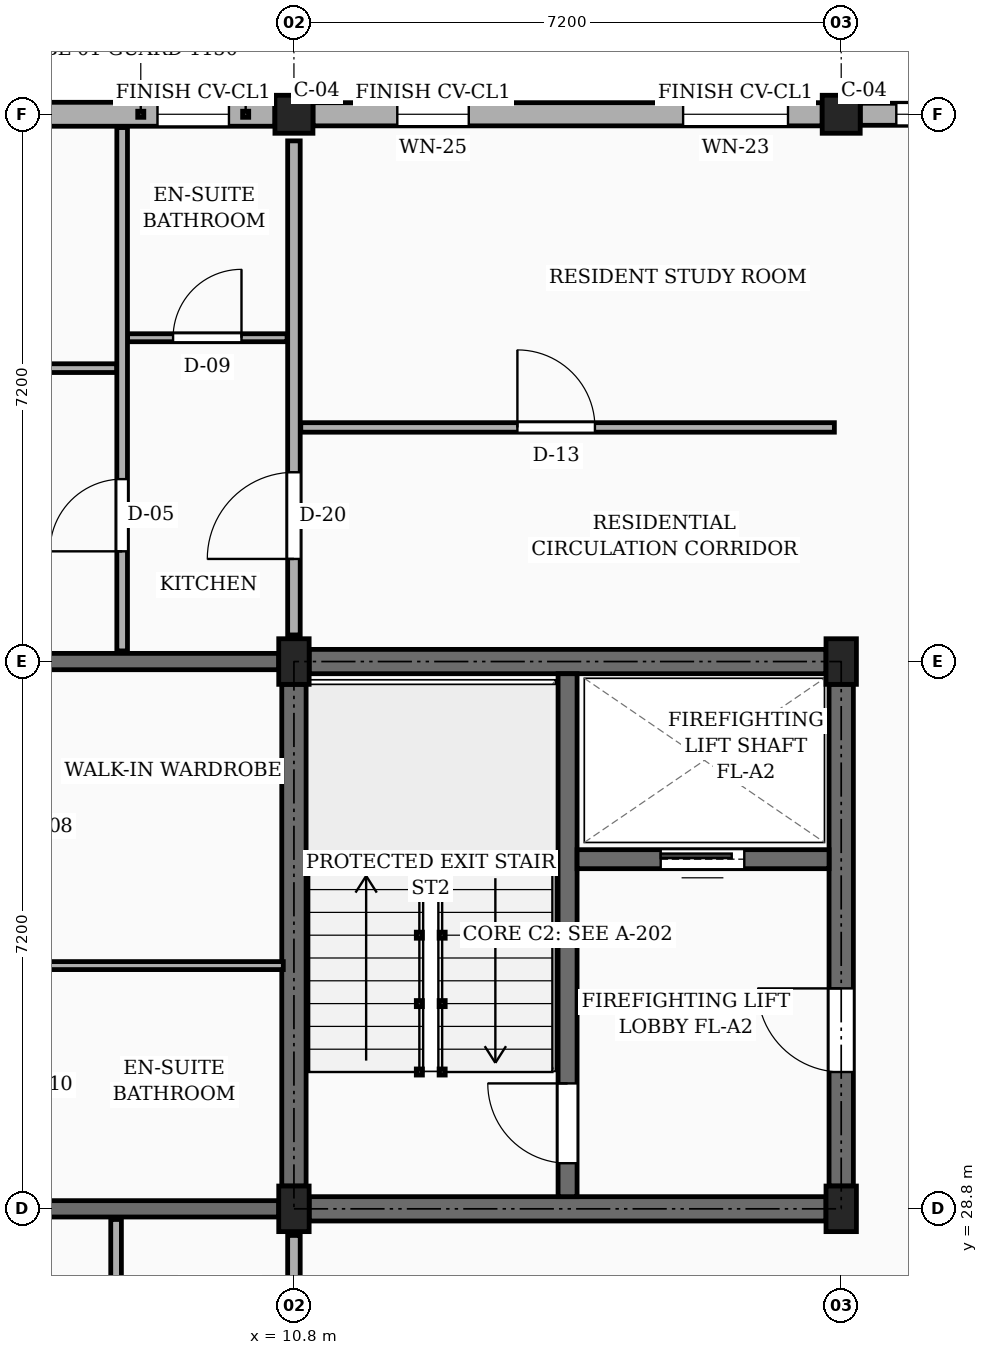
"""IFC4 building model, lengths in metres.
Left out: names, types, materials, properties, quantities, classifications, styles, units other than length and angle.
Written with IfcOpenShell. Run it as: python <this file> out.ifc"""

import sys

from ifc_helpers import new_model, si_unit, direction, frame, frame_2d, origin, origin_2d, place, context, subcontext, project, spatial, rectangle, extrude, element, fill, save


model = new_model("IFC4")
c1 = context("Model", 3, precision=1e-05, world=origin(), true_north=direction((0.0, 1.0)))
c2 = subcontext(c1, "Body", "Model", "MODEL_VIEW")
j1 = project(units=[si_unit("LENGTHUNIT", "METRE"), si_unit("PLANEANGLEUNIT", "RADIAN")], contexts=[c1])
p1 = place(None, origin())
s1 = spatial("IfcSite", under=j1, at=p1, CompositionType="ELEMENT")
p2 = place(p1, origin())
s2 = spatial("IfcBuilding", under=s1, at=p2, CompositionType="ELEMENT")
p3 = place(p2, frame((0.0, 0.0, 26.55)))
s3 = spatial("IfcBuildingStorey", under=s2, at=p3, CompositionType="ELEMENT", Elevation=26.55)
for number, where, z_axis, x_axis in (
    (1, (10.8, 28.8, 0.0), (0.0, 0.0, 1.0), (1.0, 0.0, 0.0)),
    (2, (10.8, 36.0, 0.0), (0.0, 0.0, 1.0), (1.0, 0.0, 0.0)),
):
    element("IfcColumn", number, at=place(p3, frame(where, z_axis=z_axis, x_axis=x_axis)), inside=s3, PredefinedType="COLUMN", context=c2, shape_type="SweptSolid", body=[
        extrude(rectangle(XDim=0.4, YDim=0.6, at=origin_2d()), origin(), (0.0, 0.0, 1.0), 3.15),
    ])
p4 = place(p3, frame((10.8, 43.2, 0.0), z_axis=(0.0, 0.0, 1.0), x_axis=(1.0, 0.0, 0.0)))
e3 = element("IfcColumn", 3, at=p4, inside=s3, PredefinedType="COLUMN", context=c2, shape_type="SweptSolid", body=[
    extrude(rectangle(XDim=0.5, YDim=0.5, at=origin_2d()), origin(), (0.0, 0.0, 1.0), 3.15),
])
for number, where, z_axis, x_axis in (
    (4, (18.0, 28.8, 0.0), (0.0, 0.0, 1.0), (1.0, 0.0, 0.0)),
    (5, (18.0, 36.0, 0.0), (0.0, 0.0, 1.0), (1.0, 0.0, 0.0)),
):
    element("IfcColumn", number, at=place(p3, frame(where, z_axis=z_axis, x_axis=x_axis)), inside=s3, PredefinedType="COLUMN", context=c2, shape_type="SweptSolid", body=[
        extrude(rectangle(XDim=0.4, YDim=0.6, at=origin_2d()), origin(), (0.0, 0.0, 1.0), 3.15),
    ])
p5 = place(p3, frame((18.0, 43.2, 0.0), z_axis=(0.0, 0.0, 1.0), x_axis=(1.0, 0.0, 0.0)))
e6 = element("IfcColumn", 6, at=p5, inside=s3, PredefinedType="COLUMN", context=c2, shape_type="SweptSolid", body=[
    extrude(rectangle(XDim=0.5, YDim=0.5, at=origin_2d()), origin(), (0.0, 0.0, 1.0), 3.15),
])
p6 = place(p3, frame((3.85, 28.8, 0.0), z_axis=(0.0, 0.0, 1.0), x_axis=(1.0, 0.0, 0.0)))
e7 = element("IfcWall", 7, at=p6, inside=s3, PredefinedType="SOLIDWALL", context=c2, shape_type="SweptSolid", body=[
    extrude(rectangle(XDim=6.75, YDim=0.215, at=frame_2d((3.375, 0.0))), origin(), (0.0, 0.0, 1.0), 2.17),
])
p7 = place(p6, frame((1.35, 0.0, 0.0)))
e8 = element("IfcOpeningElement", 8, at=p7, cuts=e7, PredefinedType="OPENING", context=c2, shape_type="SweptSolid", body=[
    extrude(rectangle(XDim=0.98, YDim=2.12, at=frame_2d((0.49, 1.06))), frame((0.0, 0.118, 0.0), z_axis=(0.0, -1.0, 0.0), x_axis=(1.0, 0.0, 0.0)), (0.0, 0.0, 1.0), 0.235),
])
p8 = place(p3, frame((3.85, 36.0, 0.0), z_axis=(0.0, 0.0, 1.0), x_axis=(1.0, 0.0, 0.0)))
e9 = element("IfcWall", 9, at=p8, inside=s3, PredefinedType="SOLIDWALL", context=c2, shape_type="SweptSolid", body=[
    extrude(rectangle(XDim=6.75, YDim=0.215, at=frame_2d((3.375, 0.0))), origin(), (0.0, 0.0, 1.0), 2.17),
])
p9 = place(p3, frame((24.95, 43.2, 0.0), z_axis=(0.0, 0.0, 1.0), x_axis=(-1.0, 0.0, 0.0)))
e10 = element("IfcWall", 10, at=p9, inside=s3, PredefinedType="SOLIDWALL", context=c2, shape_type="SweptSolid", body=[
    extrude(rectangle(XDim=6.7, YDim=0.29, at=frame_2d((3.35, 0.0))), origin(), (0.0, 0.0, 1.0), 2.44),
])
p10 = place(p9, frame((0.45, 0.0, 0.78)))
e11 = element("IfcOpeningElement", 11, at=p10, cuts=e10, PredefinedType="OPENING", context=c2, shape_type="SweptSolid", body=[
    extrude(rectangle(XDim=1.14, YDim=1.36, at=frame_2d((0.57, 0.68))), frame((0.0, 0.155, 0.0), z_axis=(0.0, -1.0, 0.0), x_axis=(1.0, 0.0, 0.0)), (0.0, 0.0, 1.0), 0.31),
])
p11 = place(p9, frame((2.725, 0.0, 0.78)))
e12 = element("IfcOpeningElement", 12, at=p11, cuts=e10, PredefinedType="OPENING", context=c2, shape_type="SweptSolid", body=[
    extrude(rectangle(XDim=1.3, YDim=1.36, at=frame_2d((0.65, 0.68))), frame((0.0, 0.155, 0.0), z_axis=(0.0, -1.0, 0.0), x_axis=(1.0, 0.0, 0.0)), (0.0, 0.0, 1.0), 0.31),
])
p12 = place(p9, frame((5.185, 0.0, 0.78)))
e13 = element("IfcOpeningElement", 13, at=p12, cuts=e10, PredefinedType="OPENING", context=c2, shape_type="SweptSolid", body=[
    extrude(rectangle(XDim=1.04, YDim=1.26, at=frame_2d((0.52, 0.63))), frame((0.0, 0.155, 0.0), z_axis=(0.0, -1.0, 0.0), x_axis=(1.0, 0.0, 0.0)), (0.0, 0.0, 1.0), 0.31),
])
p13 = place(p3, frame((17.75, 43.2, 0.0), z_axis=(0.0, 0.0, 1.0), x_axis=(-1.0, 0.0, 0.0)))
e14 = element("IfcWall", 14, at=p13, inside=s3, PredefinedType="SOLIDWALL", context=c2, shape_type="SweptSolid", body=[
    extrude(rectangle(XDim=6.7, YDim=0.305, at=frame_2d((3.35, 0.0))), origin(), (0.0, 0.0, 1.0), 2.44),
])
p14 = place(p13, frame((0.45, 0.0, 0.78)))
e15 = element("IfcOpeningElement", 15, at=p14, cuts=e14, PredefinedType="OPENING", context=c2, shape_type="SweptSolid", body=[
    extrude(rectangle(XDim=1.38, YDim=1.36, at=frame_2d((0.69, 0.68))), frame((0.0, 0.163, 0.0), z_axis=(0.0, -1.0, 0.0), x_axis=(1.0, 0.0, 0.0)), (0.0, 0.0, 1.0), 0.325),
])
p15 = place(p13, frame((4.65, 0.0, 0.78)))
e16 = element("IfcOpeningElement", 16, at=p15, cuts=e14, PredefinedType="OPENING", context=c2, shape_type="SweptSolid", body=[
    extrude(rectangle(XDim=0.94, YDim=1.44, at=frame_2d((0.47, 0.72))), frame((0.0, 0.163, 0.0), z_axis=(0.0, -1.0, 0.0), x_axis=(1.0, 0.0, 0.0)), (0.0, 0.0, 1.0), 0.325),
])
p16 = place(p3, frame((10.55, 43.2, 0.0), z_axis=(0.0, 0.0, 1.0), x_axis=(-1.0, 0.0, 0.0)))
e17 = element("IfcWall", 17, at=p16, inside=s3, PredefinedType="SOLIDWALL", context=c2, shape_type="SweptSolid", body=[
    extrude(rectangle(XDim=6.7, YDim=0.315, at=frame_2d((3.35, 0.0))), origin(), (0.0, 0.0, 1.0), 2.44),
])
p17 = place(p16, frame((0.605, 0.0, 0.78)))
e18 = element("IfcOpeningElement", 18, at=p17, cuts=e17, PredefinedType="OPENING", context=c2, shape_type="SweptSolid", body=[
    extrude(rectangle(XDim=0.94, YDim=1.44, at=frame_2d((0.47, 0.72))), frame((0.0, 0.167, 0.0), z_axis=(0.0, -1.0, 0.0), x_axis=(1.0, 0.0, 0.0)), (0.0, 0.0, 1.0), 0.335),
])
p18 = place(p16, frame((3.71, 0.0, 0.78)))
e19 = element("IfcOpeningElement", 19, at=p18, cuts=e17, PredefinedType="OPENING", context=c2, shape_type="SweptSolid", body=[
    extrude(rectangle(XDim=1.15, YDim=1.44, at=frame_2d((0.575, 0.72))), frame((0.0, 0.167, 0.0), z_axis=(0.0, -1.0, 0.0), x_axis=(1.0, 0.0, 0.0)), (0.0, 0.0, 1.0), 0.335),
])
p19 = place(p3, frame((10.8, 29.1, 0.0), z_axis=(0.0, 0.0, 1.0), x_axis=(0.0, 1.0, 0.0)))
e20 = element("IfcWall", 20, at=p19, inside=s3, PredefinedType="SHEAR", context=c2, shape_type="SweptSolid", body=[
    extrude(rectangle(XDim=6.6, YDim=0.32, at=frame_2d((3.3, 0.0))), origin(), (0.0, 0.0, 1.0), 2.87),
])
p20 = place(p3, frame((11.0, 36.0, 0.0), z_axis=(0.0, 0.0, 1.0), x_axis=(1.0, 0.0, 0.0)))
e21 = element("IfcWall", 21, at=p20, inside=s3, PredefinedType="SHEAR", context=c2, shape_type="SweptSolid", body=[
    extrude(rectangle(XDim=6.8, YDim=0.32, at=frame_2d((3.4, 0.0))), origin(), (0.0, 0.0, 1.0), 2.87),
])
p21 = place(p3, frame((18.0, 29.1, 0.0), z_axis=(0.0, 0.0, 1.0), x_axis=(0.0, 1.0, 0.0)))
e22 = element("IfcWall", 22, at=p21, inside=s3, PredefinedType="SHEAR", context=c2, shape_type="SweptSolid", body=[
    extrude(rectangle(XDim=6.6, YDim=0.32, at=frame_2d((3.3, 0.0))), origin(), (0.0, 0.0, 1.0), 2.87),
])
p22 = place(p21, frame((1.5, 0.0, 0.0)))
e23 = element("IfcOpeningElement", 23, at=p22, cuts=e22, PredefinedType="OPENING", context=c2, shape_type="SweptSolid", body=[
    extrude(rectangle(XDim=1.1, YDim=2.15, at=frame_2d((0.55, 1.075))), frame((0.0, 0.17, 0.0), z_axis=(0.0, -1.0, 0.0), x_axis=(1.0, 0.0, 0.0)), (0.0, 0.0, 1.0), 0.34),
])
p23 = place(p3, frame((11.0, 28.8, 0.0), z_axis=(0.0, 0.0, 1.0), x_axis=(1.0, 0.0, 0.0)))
e24 = element("IfcWall", 24, at=p23, inside=s3, PredefinedType="SHEAR", context=c2, shape_type="SweptSolid", body=[
    extrude(rectangle(XDim=6.8, YDim=0.32, at=frame_2d((3.4, 0.0))), origin(), (0.0, 0.0, 1.0), 2.87),
])
p24 = place(p3, frame((14.4, 28.96, 0.0), z_axis=(0.0, 0.0, 1.0), x_axis=(0.0, 1.0, 0.0)))
e25 = element("IfcWall", 25, at=p24, inside=s3, PredefinedType="SHEAR", context=c2, shape_type="SweptSolid", body=[
    extrude(rectangle(XDim=6.88, YDim=0.25, at=frame_2d((3.44, 0.0))), origin(), (0.0, 0.0, 1.0), 2.87),
])
p25 = place(p24, frame((0.44, 0.0, 0.0)))
e26 = element("IfcOpeningElement", 26, at=p25, cuts=e25, PredefinedType="OPENING", context=c2, shape_type="SweptSolid", body=[
    extrude(rectangle(XDim=1.05, YDim=2.15, at=frame_2d((0.525, 1.075))), frame((0.0, 0.135, 0.0), z_axis=(0.0, -1.0, 0.0), x_axis=(1.0, 0.0, 0.0)), (0.0, 0.0, 1.0), 0.27),
])
p26 = place(p3, frame((14.525, 33.4, 0.0), z_axis=(0.0, 0.0, 1.0), x_axis=(1.0, 0.0, 0.0)))
e27 = element("IfcWall", 27, at=p26, inside=s3, PredefinedType="SHEAR", context=c2, shape_type="SweptSolid", body=[
    extrude(rectangle(XDim=3.315, YDim=0.25, at=frame_2d((1.658, 0.0))), origin(), (0.0, 0.0, 1.0), 2.87),
])
p27 = place(p26, frame((1.1, 0.0, 0.0)))
e28 = element("IfcOpeningElement", 28, at=p27, cuts=e27, PredefinedType="OPENING", context=c2, shape_type="SweptSolid", body=[
    extrude(rectangle(XDim=1.1, YDim=2.2, at=frame_2d((0.55, 1.1))), frame((0.0, 0.135, 0.0), z_axis=(0.0, -1.0, 0.0), x_axis=(1.0, 0.0, 0.0)), (0.0, 0.0, 1.0), 0.27),
])
p28 = place(p3, frame((10.8, 21.95, 0.0), z_axis=(0.0, 0.0, 1.0), x_axis=(0.0, 1.0, 0.0)))
e29 = element("IfcWall", 29, at=p28, inside=s3, PredefinedType="PARTITIONING", context=c2, shape_type="SweptSolid", body=[
    extrude(rectangle(XDim=6.5, YDim=0.165, at=frame_2d((3.25, 0.0))), origin(), (0.0, 0.0, 1.0), 2.305),
])
p29 = place(p28, frame((1.0, 0.0, 0.0)))
e30 = element("IfcOpeningElement", 30, at=p29, cuts=e29, PredefinedType="OPENING", context=c2, shape_type="SweptSolid", body=[
    extrude(rectangle(XDim=0.94, YDim=2.12, at=frame_2d((0.47, 1.06))), frame((0.0, 0.093, 0.0), z_axis=(0.0, -1.0, 0.0), x_axis=(1.0, 0.0, 0.0)), (0.0, 0.0, 1.0), 0.185),
])
p30 = place(p3, frame((10.8, 36.35, 0.0), z_axis=(0.0, 0.0, 1.0), x_axis=(0.0, 1.0, 0.0)))
e31 = element("IfcWall", 31, at=p30, inside=s3, PredefinedType="PARTITIONING", context=c2, shape_type="SweptSolid", body=[
    extrude(rectangle(XDim=6.5, YDim=0.165, at=frame_2d((3.25, 0.0))), origin(), (0.0, 0.0, 1.0), 2.305),
])
p31 = place(p30, frame((1.0, 0.0, 0.0)))
e32 = element("IfcOpeningElement", 32, at=p31, cuts=e31, PredefinedType="OPENING", context=c2, shape_type="SweptSolid", body=[
    extrude(rectangle(XDim=1.14, YDim=2.18, at=frame_2d((0.57, 1.09))), frame((0.0, 0.093, 0.0), z_axis=(0.0, -1.0, 0.0), x_axis=(1.0, 0.0, 0.0)), (0.0, 0.0, 1.0), 0.185),
])
p32 = place(p3, frame((8.46, 21.74, 0.0), z_axis=(0.0, 0.0, 1.0), x_axis=(0.0, 1.0, 0.0)))
e33 = element("IfcWall", 33, at=p32, inside=s3, PredefinedType="PARTITIONING", context=c2, shape_type="SweptSolid", body=[
    extrude(rectangle(XDim=6.92, YDim=0.14, at=frame_2d((3.46, 0.0))), origin(), (0.0, 0.0, 1.0), 2.305),
])
p33 = place(p32, frame((1.31, 0.0, 0.0)))
e34 = element("IfcOpeningElement", 34, at=p33, cuts=e33, PredefinedType="OPENING", context=c2, shape_type="SweptSolid", body=[
    extrude(rectangle(XDim=0.92, YDim=2.1, at=frame_2d((0.46, 1.05))), frame((0.0, 0.08, 0.0), z_axis=(0.0, -1.0, 0.0), x_axis=(1.0, 0.0, 0.0)), (0.0, 0.0, 1.0), 0.16),
])
p34 = place(p3, frame((7.27, 32.0, 0.0), z_axis=(0.0, 0.0, 1.0), x_axis=(1.0, 0.0, 0.0)))
e35 = element("IfcWall", 35, at=p34, inside=s3, PredefinedType="PARTITIONING", context=c2, shape_type="SweptSolid", body=[
    extrude(rectangle(XDim=3.39, YDim=0.105, at=frame_2d((1.695, 0.0))), origin(), (0.0, 0.0, 1.0), 2.305),
])
p35 = place(p3, frame((10.89, 39.08, 0.0), z_axis=(0.0, 0.0, 1.0), x_axis=(1.0, 0.0, 0.0)))
e36 = element("IfcWall", 36, at=p35, inside=s3, PredefinedType="PARTITIONING", context=c2, shape_type="SweptSolid", body=[
    extrude(rectangle(XDim=7.02, YDim=0.125, at=frame_2d((3.51, 0.0))), origin(), (0.0, 0.0, 1.0), 2.305),
])
p36 = place(p35, frame((2.85, 0.0, 0.0)))
e37 = element("IfcOpeningElement", 37, at=p36, cuts=e36, PredefinedType="OPENING", context=c2, shape_type="SweptSolid", body=[
    extrude(rectangle(XDim=1.02, YDim=2.15, at=frame_2d((0.51, 1.075))), frame((0.0, 0.073, 0.0), z_axis=(0.0, -1.0, 0.0), x_axis=(1.0, 0.0, 0.0)), (0.0, 0.0, 1.0), 0.145),
])
p37 = place(p3, frame((3.775, 39.86, 0.0), z_axis=(0.0, 0.0, 1.0), x_axis=(1.0, 0.0, 0.0)))
e38 = element("IfcWall", 38, at=p37, inside=s3, PredefinedType="PARTITIONING", context=c2, shape_type="SweptSolid", body=[
    extrude(rectangle(XDim=4.695, YDim=0.115, at=frame_2d((2.348, 0.0))), origin(), (0.0, 0.0, 1.0), 2.305),
])
p38 = place(p37, frame((1.897, 0.0, 0.0)))
e39 = element("IfcOpeningElement", 39, at=p38, cuts=e38, PredefinedType="OPENING", context=c2, shape_type="SweptSolid", body=[
    extrude(rectangle(XDim=0.9, YDim=2.1, at=frame_2d((0.45, 1.05))), frame((0.0, 0.067, 0.0), z_axis=(0.0, -1.0, 0.0), x_axis=(1.0, 0.0, 0.0)), (0.0, 0.0, 1.0), 0.135),
])
p39 = place(p3, frame((8.61, 40.26, 0.0), z_axis=(0.0, 0.0, 1.0), x_axis=(1.0, 0.0, 0.0)))
e40 = element("IfcWall", 40, at=p39, inside=s3, PredefinedType="PARTITIONING", context=c2, shape_type="SweptSolid", body=[
    extrude(rectangle(XDim=2.1, YDim=0.105, at=frame_2d((1.05, 0.0))), origin(), (0.0, 0.0, 1.0), 2.305),
])
p40 = place(p39, frame((0.6, 0.0, 0.0)))
e41 = element("IfcOpeningElement", 41, at=p40, cuts=e40, PredefinedType="OPENING", context=c2, shape_type="SweptSolid", body=[
    extrude(rectangle(XDim=0.9, YDim=2.05, at=frame_2d((0.45, 1.025))), frame((0.0, 0.062, 0.0), z_axis=(0.0, -1.0, 0.0), x_axis=(1.0, 0.0, 0.0)), (0.0, 0.0, 1.0), 0.125),
])
p41 = place(p3, frame((8.54, 36.14, 0.0), z_axis=(0.0, 0.0, 1.0), x_axis=(0.0, 1.0, 0.0)))
e42 = element("IfcWall", 42, at=p41, inside=s3, PredefinedType="PARTITIONING", context=c2, shape_type="SweptSolid", body=[
    extrude(rectangle(XDim=6.885, YDim=0.14, at=frame_2d((3.442, 0.0))), origin(), (0.0, 0.0, 1.0), 2.305),
])
p42 = place(p41, frame((1.31, 0.0, 0.0)))
e43 = element("IfcOpeningElement", 43, at=p42, cuts=e42, PredefinedType="OPENING", context=c2, shape_type="SweptSolid", body=[
    extrude(rectangle(XDim=0.95, YDim=2.1, at=frame_2d((0.475, 1.05))), frame((0.0, 0.08, 0.0), z_axis=(0.0, -1.0, 0.0), x_axis=(1.0, 0.0, 0.0)), (0.0, 0.0, 1.0), 0.16),
])
p43 = place(p12, origin())
e44 = element("IfcWindow", 44, at=p43, inside=s3, PartitioningType="SINGLE_PANEL", PredefinedType="WINDOW", context=c2, shape_type="SweptSolid", body=[
    extrude(rectangle(XDim=1.04, YDim=1.26, at=frame_2d((0.52, 0.63))), frame((0.0, 0.03, 0.0), z_axis=(0.0, -1.0, 0.0), x_axis=(1.0, 0.0, 0.0)), (0.0, 0.0, 1.0), 0.06),
])
fill(e13, e44)
p44 = place(p14, origin())
e45 = element("IfcWindow", 45, at=p44, inside=s3, PartitioningType="SINGLE_PANEL", PredefinedType="WINDOW", context=c2, shape_type="SweptSolid", body=[
    extrude(rectangle(XDim=1.38, YDim=1.36, at=frame_2d((0.69, 0.68))), frame((0.0, 0.03, 0.0), z_axis=(0.0, -1.0, 0.0), x_axis=(1.0, 0.0, 0.0)), (0.0, 0.0, 1.0), 0.06),
])
fill(e15, e45)
p45 = place(p15, origin())
e46 = element("IfcWindow", 46, at=p45, inside=s3, PartitioningType="SINGLE_PANEL", PredefinedType="WINDOW", context=c2, shape_type="SweptSolid", body=[
    extrude(rectangle(XDim=0.94, YDim=1.44, at=frame_2d((0.47, 0.72))), frame((0.0, 0.03, 0.0), z_axis=(0.0, -1.0, 0.0), x_axis=(1.0, 0.0, 0.0)), (0.0, 0.0, 1.0), 0.06),
])
fill(e16, e46)
p46 = place(p17, origin())
e47 = element("IfcWindow", 47, at=p46, inside=s3, PartitioningType="SINGLE_PANEL", PredefinedType="WINDOW", context=c2, shape_type="SweptSolid", body=[
    extrude(rectangle(XDim=0.94, YDim=1.44, at=frame_2d((0.47, 0.72))), frame((0.0, 0.03, 0.0), z_axis=(0.0, -1.0, 0.0), x_axis=(1.0, 0.0, 0.0)), (0.0, 0.0, 1.0), 0.06),
])
fill(e18, e47)
p47 = place(p22, frame((1.1, 0.0, 0.0), z_axis=(0.0, 0.0, 1.0), x_axis=(-1.0, 0.0, 0.0)))
e48 = element("IfcDoor", 48, at=p47, inside=s3, OperationType="SINGLE_SWING_RIGHT", PredefinedType="DOOR", context=c2, shape_type="SweptSolid", body=[
    extrude(rectangle(XDim=1.1, YDim=2.15, at=frame_2d((0.55, 1.075))), frame((0.0, 0.025, 0.0), z_axis=(0.0, -1.0, 0.0), x_axis=(1.0, 0.0, 0.0)), (0.0, 0.0, 1.0), 0.05),
])
fill(e23, e48)
p48 = place(p25, origin())
e49 = element("IfcDoor", 49, at=p48, inside=s3, OperationType="SINGLE_SWING_RIGHT", PredefinedType="DOOR", context=c2, shape_type="SweptSolid", body=[
    extrude(rectangle(XDim=1.05, YDim=2.15, at=frame_2d((0.525, 1.075))), frame((0.0, 0.025, 0.0), z_axis=(0.0, -1.0, 0.0), x_axis=(1.0, 0.0, 0.0)), (0.0, 0.0, 1.0), 0.05),
])
fill(e26, e49)
p49 = place(p27, origin())
e50 = element("IfcDoor", 50, at=p49, inside=s3, OperationType="SLIDING_TO_LEFT", PredefinedType="DOOR", context=c2, shape_type="SweptSolid", body=[
    extrude(rectangle(XDim=1.1, YDim=2.2, at=frame_2d((0.55, 1.1))), frame((0.0, 0.025, 0.0), z_axis=(0.0, -1.0, 0.0), x_axis=(1.0, 0.0, 0.0)), (0.0, 0.0, 1.0), 0.05),
])
fill(e28, e50)
p50 = place(p31, origin())
e51 = element("IfcDoor", 51, at=p50, inside=s3, OperationType="SINGLE_SWING_LEFT", PredefinedType="DOOR", context=c2, shape_type="SweptSolid", body=[
    extrude(rectangle(XDim=1.14, YDim=2.18, at=frame_2d((0.57, 1.09))), frame((0.0, 0.025, 0.0), z_axis=(0.0, -1.0, 0.0), x_axis=(1.0, 0.0, 0.0)), (0.0, 0.0, 1.0), 0.05),
])
fill(e32, e51)
p51 = place(p36, origin())
e52 = element("IfcDoor", 52, at=p51, inside=s3, OperationType="SINGLE_SWING_LEFT", PredefinedType="DOOR", context=c2, shape_type="SweptSolid", body=[
    extrude(rectangle(XDim=1.02, YDim=2.15, at=frame_2d((0.51, 1.075))), frame((0.0, 0.025, 0.0), z_axis=(0.0, -1.0, 0.0), x_axis=(1.0, 0.0, 0.0)), (0.0, 0.0, 1.0), 0.05),
])
fill(e37, e52)
p52 = place(p40, origin())
e53 = element("IfcDoor", 53, at=p52, inside=s3, OperationType="SINGLE_SWING_RIGHT", PredefinedType="DOOR", context=c2, shape_type="SweptSolid", body=[
    extrude(rectangle(XDim=0.9, YDim=2.05, at=frame_2d((0.45, 1.025))), frame((0.0, 0.025, 0.0), z_axis=(0.0, -1.0, 0.0), x_axis=(1.0, 0.0, 0.0)), (0.0, 0.0, 1.0), 0.05),
])
fill(e41, e53)
p53 = place(p42, origin())
e54 = element("IfcDoor", 54, at=p53, inside=s3, OperationType="SINGLE_SWING_LEFT", PredefinedType="DOOR", context=c2, shape_type="SweptSolid", body=[
    extrude(rectangle(XDim=0.95, YDim=2.1, at=frame_2d((0.475, 1.05))), frame((0.0, 0.025, 0.0), z_axis=(0.0, -1.0, 0.0), x_axis=(1.0, 0.0, 0.0)), (0.0, 0.0, 1.0), 0.05),
])
fill(e43, e54)
save(model, sys.argv[1])
